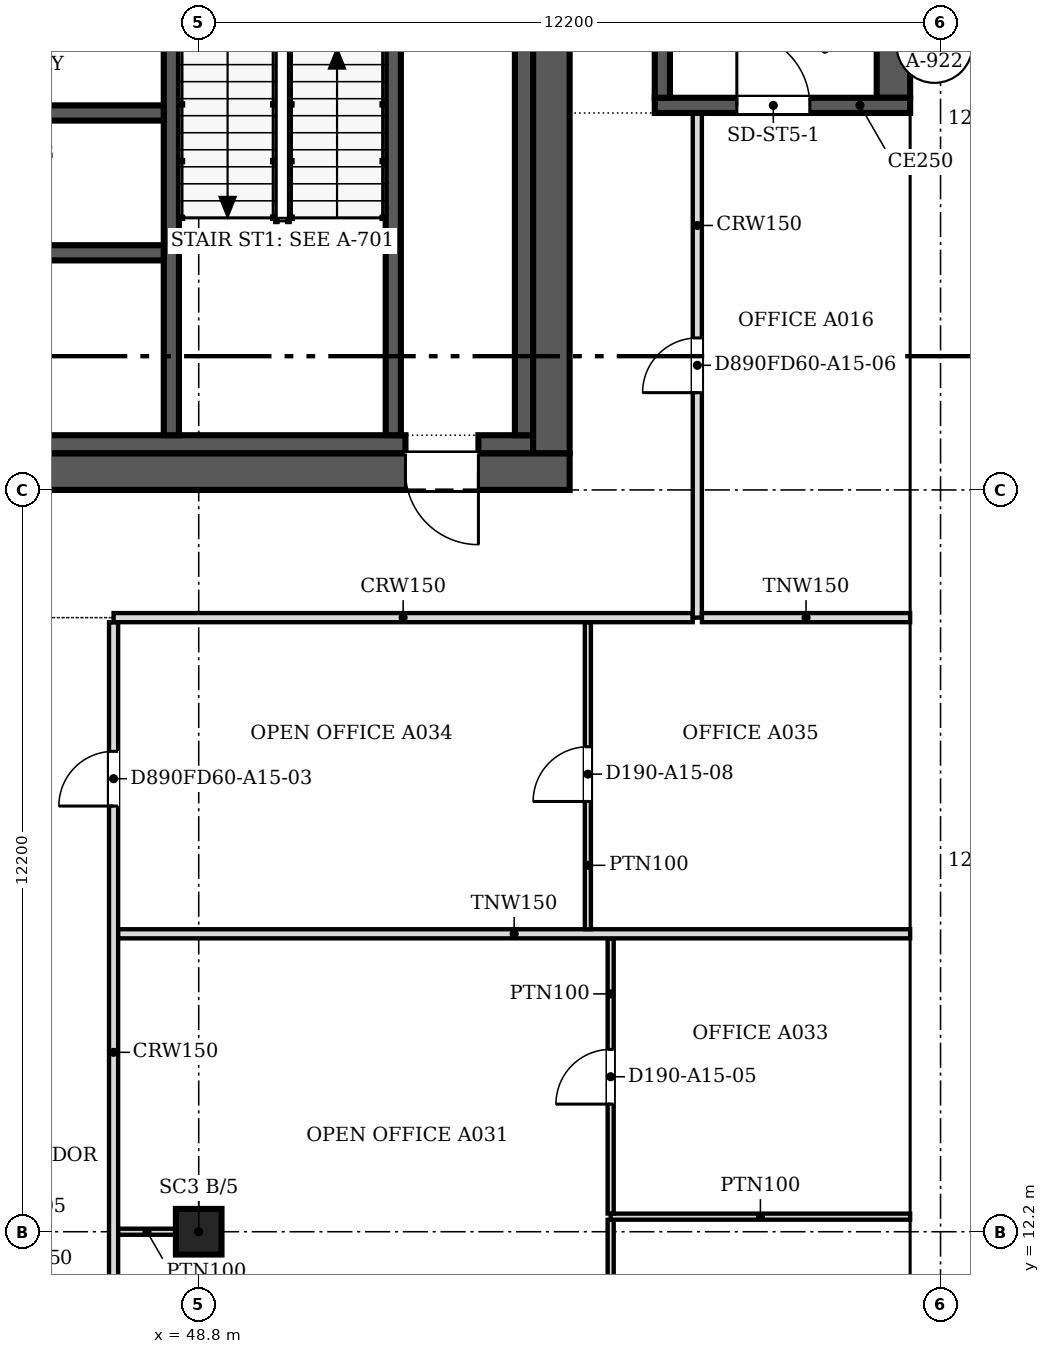
"""IFC4 building model, lengths in metres.
Left out: names, types, materials, properties, quantities, classifications, styles, units other than length and angle.
Written with IfcOpenShell. Run it as: python <this file> out.ifc"""

import sys

from ifc_helpers import new_model, si_unit, direction, frame, frame_2d, origin, origin_2d, place, context, subcontext, project, spatial, polyline, rectangle, outline, extrude, faceted_brep, source, transform, mapped, element, fill, save


model = new_model("IFC4")
c1 = context("Model", 3, precision=1e-05, world=origin(), true_north=direction((0.0, 1.0)))
c2 = subcontext(c1, "Body", "Model", "MODEL_VIEW")
j1 = project(units=[si_unit("LENGTHUNIT", "METRE"), si_unit("PLANEANGLEUNIT", "RADIAN")], contexts=[c1])
p1 = place(None, origin())
s1 = spatial("IfcSite", under=j1, at=p1, CompositionType="ELEMENT")
p2 = place(p1, origin())
s2 = spatial("IfcBuilding", under=s1, at=p2, CompositionType="ELEMENT")
p3 = place(p2, frame((0.0, 0.0, 166.8)))
s3 = spatial("IfcBuildingStorey", under=s2, at=p3, CompositionType="ELEMENT", Elevation=166.8)
p4 = place(p3, frame((48.8, 12.2, 0.0), z_axis=(0.0, 0.0, 1.0), x_axis=(1.0, 0.0, 0.0)))
e1 = element("IfcColumn", 1, at=p4, inside=s3, PredefinedType="COLUMN", context=c2, shape_type="SweptSolid", body=[
    extrude(rectangle(XDim=0.75, YDim=0.75, at=origin_2d()), origin(), (0.0, 0.0, 1.0), 3.6),
])
m1 = source(origin(), c2, "Body", "SweptSolid", [
    extrude(outline(polyline([(3.05, 0.0), (6.1, 3.8), (3.05, 7.6), (0.0, 3.8), (3.05, 0.0)])), frame((0.0, 0.25, 0.0), z_axis=(0.0, -1.0, 0.0), x_axis=(1.0, 0.0, 0.0)), (0.0, 0.0, 1.0), 0.5),
])
p5 = place(p3, frame((60.75, 9.15, -3.8), z_axis=(0.0, 0.0, 1.0), x_axis=(0.0, 1.0, 0.0)))
e2 = element("IfcWall", 2, at=p5, inside=s3, PredefinedType="SOLIDWALL", context=c2, shape_type="MappedRepresentation", body=[
    mapped(m1, transform((0.0, 0.0, 0.0), scale=1.0)),
])
m2 = source(origin(), c2, "Body", "SweptSolid", [
    extrude(outline(polyline([(3.05, 0.399), (5.78, 3.8), (3.05, 7.201), (0.321, 3.8), (3.05, 0.399)])), frame((0.0, 0.26, 0.0), z_axis=(0.0, -1.0, 0.0), x_axis=(1.0, 0.0, 0.0)), (0.0, 0.0, 1.0), 0.52),
])
p6 = place(p5, origin())
e3 = element("IfcOpeningElement", 3, at=p6, cuts=e2, PredefinedType="OPENING", context=c2, shape_type="MappedRepresentation", body=[
    mapped(m2, transform((0.0, 0.0, 0.0), scale=1.0)),
])
p7 = place(p3, frame((60.75, 15.25, -3.8), z_axis=(0.0, 0.0, 1.0), x_axis=(0.0, 1.0, 0.0)))
e4 = element("IfcWall", 4, at=p7, inside=s3, PredefinedType="SOLIDWALL", context=c2, shape_type="MappedRepresentation", body=[
    mapped(m1, transform((0.0, 0.0, 0.0), scale=1.0)),
])
p8 = place(p7, origin())
e5 = element("IfcOpeningElement", 5, at=p8, cuts=e4, PredefinedType="OPENING", context=c2, shape_type="MappedRepresentation", body=[
    mapped(m2, transform((0.0, 0.0, 0.0), scale=1.0)),
])
m3 = source(origin(), c2, "Body", "Brep", [
    faceted_brep([(3.05, -0.25, 0.0), (6.1, -0.25, 3.8), (6.1, -0.25, 3.8), (3.05, -0.25, 7.6), (0.0, -0.25, 3.8), (0.0, 0.25, 3.8), (3.05, 0.25, 7.6), (6.1, 0.25, 3.8), (6.1, 0.25, 3.8), (3.05, 0.25, 0.0)], [[[0, 1, 2, 3, 4]], [[5, 6, 7, 8, 9]], [[9, 8, 1, 0]], [[7, 6, 3, 2]], [[6, 5, 4, 3]], [[5, 9, 0, 4]], [[1, 8, 7, 2]]]),
])
p9 = place(p3, frame((60.75, 21.35, -3.8), z_axis=(0.0, 0.0, 1.0), x_axis=(0.0, 1.0, 0.0)))
e6 = element("IfcWall", 6, at=p9, inside=s3, PredefinedType="SOLIDWALL", context=c2, shape_type="MappedRepresentation", body=[
    mapped(m3, transform((0.0, 0.0, 0.0), scale=1.0)),
])
p10 = place(p9, origin())
e7 = element("IfcOpeningElement", 7, at=p10, cuts=e6, PredefinedType="OPENING", context=c2, shape_type="MappedRepresentation", body=[
    mapped(m2, transform((0.0, 0.0, 0.0), scale=1.0)),
])
p11 = place(p3, frame((60.75, 27.45, -3.8), z_axis=(0.0, 0.0, 1.0), x_axis=(0.0, 1.0, 0.0)))
e8 = element("IfcWall", 8, at=p11, inside=s3, PredefinedType="SOLIDWALL", context=c2, shape_type="MappedRepresentation", body=[
    mapped(m1, transform((0.0, 0.0, 0.0), scale=1.0)),
])
p12 = place(p11, origin())
e9 = element("IfcOpeningElement", 9, at=p12, cuts=e8, PredefinedType="OPENING", context=c2, shape_type="MappedRepresentation", body=[
    mapped(m2, transform((0.0, 0.0, 0.0), scale=1.0)),
])
p13 = place(p2, frame((0.0, 0.0, 170.6)))
s4 = spatial("IfcBuildingStorey", under=s2, at=p13, CompositionType="ELEMENT", Elevation=170.6)
m4 = source(origin(), c2, "Body", "Brep", [
    faceted_brep([(3.003, -0.25, 0.0), (6.053, -0.25, 3.8), (3.003, -0.25, 7.6), (0.0, -0.25, 3.8), (0.047, 0.25, 3.859), (3.003, 0.25, 7.6), (6.053, 0.25, 3.8), (3.003, 0.25, 0.0), (0.047, 0.25, 3.741), (0.0, 0.0, 3.8)], [[[0, 1, 2, 3]], [[4, 5, 6, 7, 8]], [[7, 6, 1, 0]], [[6, 5, 2, 1]], [[5, 4, 9, 3, 2]], [[8, 7, 0, 3, 9]], [[8, 9, 4]]]),
])
p14 = place(p13, frame((60.75, 6.146, -3.8), z_axis=(0.0, 0.0, 1.0), x_axis=(0.0, 1.0, 0.0)))
e10 = element("IfcWall", 10, at=p14, inside=s4, PredefinedType="SOLIDWALL", context=c2, shape_type="MappedRepresentation", body=[
    mapped(m4, transform((0.0, 0.0, 0.0), scale=1.0)),
])
m5 = source(origin(), c2, "Body", "SweptSolid", [
    extrude(outline(polyline([(3.005, 0.401), (5.733, 3.8), (3.005, 7.199), (0.319, 3.8), (3.005, 0.401)])), frame((0.0, 0.26, 0.0), z_axis=(0.0, -1.0, 0.0), x_axis=(1.0, 0.0, 0.0)), (0.0, 0.0, 1.0), 0.52),
])
p15 = place(p14, origin())
e11 = element("IfcOpeningElement", 11, at=p15, cuts=e10, PredefinedType="OPENING", context=c2, shape_type="MappedRepresentation", body=[
    mapped(m5, transform((0.0, 0.0, 0.0), scale=1.0)),
])
m6 = source(origin(), c2, "Body", "SweptSolid", [
    extrude(outline(polyline([(3.05, 0.0), (6.1, 3.8), (3.05, 7.6), (0.0, 3.8), (3.05, 0.0)])), frame((0.0, 0.25, 0.0), z_axis=(0.0, -1.0, 0.0), x_axis=(1.0, 0.0, 0.0)), (0.0, 0.0, 1.0), 0.5),
])
p16 = place(p13, frame((60.75, 12.2, -3.8), z_axis=(0.0, 0.0, 1.0), x_axis=(0.0, 1.0, 0.0)))
e12 = element("IfcWall", 12, at=p16, inside=s4, PredefinedType="SOLIDWALL", context=c2, shape_type="MappedRepresentation", body=[
    mapped(m6, transform((0.0, 0.0, 0.0), scale=1.0)),
])
m7 = source(origin(), c2, "Body", "SweptSolid", [
    extrude(outline(polyline([(3.05, 0.399), (5.78, 3.8), (3.05, 7.2), (0.321, 3.8), (3.05, 0.399)])), frame((0.0, 0.26, 0.0), z_axis=(0.0, -1.0, 0.0), x_axis=(1.0, 0.0, 0.0)), (0.0, 0.0, 1.0), 0.52),
])
p17 = place(p16, origin())
e13 = element("IfcOpeningElement", 13, at=p17, cuts=e12, PredefinedType="OPENING", context=c2, shape_type="MappedRepresentation", body=[
    mapped(m7, transform((0.0, 0.0, 0.0), scale=1.0)),
])
m8 = source(origin(), c2, "Body", "Brep", [
    faceted_brep([(3.05, -0.25, 0.0), (6.1, -0.25, 3.8), (6.1, -0.25, 3.8), (3.05, -0.25, 7.6), (0.0, -0.25, 3.8), (0.0, 0.25, 3.8), (3.05, 0.25, 7.6), (6.1, 0.25, 3.8), (6.1, 0.25, 3.8), (3.05, 0.25, 0.0)], [[[0, 1, 2, 3, 4]], [[5, 6, 7, 8, 9]], [[9, 8, 1, 0]], [[7, 6, 3, 2]], [[6, 5, 4, 3]], [[5, 9, 0, 4]], [[1, 8, 7, 2]]]),
])
p18 = place(p13, frame((60.75, 18.3, -3.8), z_axis=(0.0, 0.0, 1.0), x_axis=(0.0, 1.0, 0.0)))
e14 = element("IfcWall", 14, at=p18, inside=s4, PredefinedType="SOLIDWALL", context=c2, shape_type="MappedRepresentation", body=[
    mapped(m8, transform((0.0, 0.0, 0.0), scale=1.0)),
])
p19 = place(p18, origin())
e15 = element("IfcOpeningElement", 15, at=p19, cuts=e14, PredefinedType="OPENING", context=c2, shape_type="MappedRepresentation", body=[
    mapped(m7, transform((0.0, 0.0, 0.0), scale=1.0)),
])
p20 = place(p13, frame((60.75, 24.4, -3.8), z_axis=(0.0, 0.0, 1.0), x_axis=(0.0, 1.0, 0.0)))
e16 = element("IfcWall", 16, at=p20, inside=s4, PredefinedType="SOLIDWALL", context=c2, shape_type="MappedRepresentation", body=[
    mapped(m6, transform((0.0, 0.0, 0.0), scale=1.0)),
])
p21 = place(p20, origin())
e17 = element("IfcOpeningElement", 17, at=p21, cuts=e16, PredefinedType="OPENING", context=c2, shape_type="MappedRepresentation", body=[
    mapped(m7, transform((0.0, 0.0, 0.0), scale=1.0)),
])
p22 = place(p13, frame((60.75, 30.5, -3.8), z_axis=(0.0, 0.0, 1.0), x_axis=(0.0, 1.0, 0.0)))
e18 = element("IfcWall", 18, at=p22, inside=s4, PredefinedType="SOLIDWALL", context=c2, shape_type="MappedRepresentation", body=[
    mapped(m6, transform((0.0, 0.0, 0.0), scale=1.0)),
])
p23 = place(p22, origin())
e19 = element("IfcOpeningElement", 19, at=p23, cuts=e18, PredefinedType="OPENING", context=c2, shape_type="MappedRepresentation", body=[
    mapped(m7, transform((0.0, 0.0, 0.0), scale=1.0)),
])
p24 = place(p3, frame((54.9, 24.7, 0.0), z_axis=(0.0, 0.0, 1.0), x_axis=(-1.0, 0.0, 0.0)))
e20 = element("IfcWall", 20, at=p24, inside=s3, PredefinedType="SHEAR", context=c2, shape_type="SweptSolid", body=[
    extrude(rectangle(XDim=24.4, YDim=0.6, at=frame_2d((12.2, 0.0))), origin(), (0.0, 0.0, 1.0), 3.8),
])
m9 = source(origin(), c2, "Body", "SweptSolid", [
    extrude(rectangle(XDim=1.2, YDim=2.1, at=frame_2d((0.6, 1.05))), frame((0.0, 0.31, 0.0), z_axis=(0.0, -1.0, 0.0), x_axis=(1.0, 0.0, 0.0)), (0.0, 0.0, 1.0), 0.62),
])
p25 = place(p24, frame((1.5, 0.0, 0.0)))
e21 = element("IfcOpeningElement", 21, at=p25, cuts=e20, PredefinedType="OPENING", context=c2, shape_type="MappedRepresentation", body=[
    mapped(m9, transform((0.0, 0.0, 0.0), scale=1.0)),
])
p26 = place(p3, frame((54.6, 48.2, 0.0), z_axis=(0.0, 0.0, 1.0), x_axis=(0.0, -1.0, 0.0)))
e22 = element("IfcWall", 22, at=p26, inside=s3, PredefinedType="SHEAR", context=c2, shape_type="SweptSolid", body=[
    extrude(rectangle(XDim=23.2, YDim=0.6, at=frame_2d((11.6, 0.0))), origin(), (0.0, 0.0, 1.0), 3.8),
])
p27 = place(p26, frame((4.9, 0.0, 0.0)))
e23 = element("IfcOpeningElement", 23, at=p27, cuts=e22, PredefinedType="OPENING", context=c2, shape_type="MappedRepresentation", body=[
    mapped(m9, transform((0.0, 0.0, 0.0), scale=1.0)),
])
p28 = place(p3, frame((31.1, 25.15, 0.0), z_axis=(0.0, 0.0, 1.0), x_axis=(1.0, 0.0, 0.0)))
e24 = element("IfcWall", 24, at=p28, inside=s3, PredefinedType="SOLIDWALL", context=c2, shape_type="SweptSolid", body=[
    extrude(rectangle(XDim=21.1, YDim=0.3, at=frame_2d((10.55, 0.0))), origin(), (0.0, 0.0, 1.0), 3.8),
])
p29 = place(p3, frame((53.4, 25.15, 0.0), z_axis=(0.0, 0.0, 1.0), x_axis=(1.0, 0.0, 0.0)))
e25 = element("IfcWall", 25, at=p29, inside=s3, PredefinedType="SOLIDWALL", context=c2, shape_type="SweptSolid", body=[
    extrude(rectangle(XDim=0.9, YDim=0.3, at=frame_2d((0.45, 0.0))), origin(), (0.0, 0.0, 1.0), 3.8),
])
p30 = place(p3, frame((54.15, 25.3, 0.0), z_axis=(0.0, 0.0, 1.0), x_axis=(0.0, 1.0, 0.0)))
e26 = element("IfcWall", 26, at=p30, inside=s3, PredefinedType="SOLIDWALL", context=c2, shape_type="SweptSolid", body=[
    extrude(rectangle(XDim=11.02, YDim=0.3, at=frame_2d((5.51, 0.0))), origin(), (0.0, 0.0, 1.0), 3.8),
])
p31 = place(p3, frame((48.35, 36.35, 0.0), z_axis=(0.0, 0.0, 1.0), x_axis=(0.0, -1.0, 0.0)))
e27 = element("IfcWall", 27, at=p31, inside=s3, PredefinedType="SOLIDWALL", context=c2, shape_type="SweptSolid", body=[
    extrude(rectangle(XDim=11.05, YDim=0.25, at=frame_2d((5.525, 0.0))), origin(), (0.0, 0.0, 1.0), 3.8),
])
m10 = source(origin(), c2, "Body", "SweptSolid", [
    extrude(rectangle(XDim=1.2, YDim=2.1, at=frame_2d((0.6, 1.05))), frame((0.0, 0.135, 0.0), z_axis=(0.0, -1.0, 0.0), x_axis=(1.0, 0.0, 0.0)), (0.0, 0.0, 1.0), 0.27),
])
p32 = place(p31, frame((3.225, 0.0, 0.0)))
e28 = element("IfcOpeningElement", 28, at=p32, cuts=e27, PredefinedType="OPENING", context=c2, shape_type="MappedRepresentation", body=[
    mapped(m10, transform((0.0, 0.0, 0.0), scale=1.0)),
])
p33 = place(p3, frame((52.0, 25.3, 0.0), z_axis=(0.0, 0.0, 1.0), x_axis=(0.0, 1.0, 0.0)))
e29 = element("IfcWall", 29, at=p33, inside=s3, PredefinedType="SOLIDWALL", context=c2, shape_type="SweptSolid", body=[
    extrude(rectangle(XDim=7.975, YDim=0.25, at=frame_2d((3.987, 0.0))), origin(), (0.0, 0.0, 1.0), 3.8),
])
p34 = place(p33, frame((6.625, 0.0, 0.0)))
e30 = element("IfcOpeningElement", 30, at=p34, cuts=e29, PredefinedType="OPENING", context=c2, shape_type="MappedRepresentation", body=[
    mapped(m10, transform((0.0, 0.0, 0.0), scale=1.0)),
])
for number, where, z_axis, x_axis in (
    (31, (42.95, 28.3, 0.0), (0.0, 0.0, 1.0), (1.0, 0.0, 0.0)),
    (32, (42.95, 30.6, 0.0), (0.0, 0.0, 1.0), (1.0, 0.0, 0.0)),
):
    element("IfcWall", number, at=place(p3, frame(where, z_axis=z_axis, x_axis=x_axis)), inside=s3, PredefinedType="SOLIDWALL", context=c2, shape_type="SweptSolid", body=[
        extrude(rectangle(XDim=5.275, YDim=0.25, at=frame_2d((2.638, 0.0))), origin(), (0.0, 0.0, 1.0), 3.8),
    ])
p35 = place(p3, frame((60.5, 30.725, 0.0), z_axis=(0.0, 0.0, 1.0), x_axis=(-1.0, 0.0, 0.0)))
e33 = element("IfcWall", 33, at=p35, inside=s3, PredefinedType="SOLIDWALL", context=c2, shape_type="SweptSolid", body=[
    extrude(rectangle(XDim=4.2, YDim=0.25, at=frame_2d((2.1, 0.0))), origin(), (0.0, 0.0, 1.0), 3.8),
])
p36 = place(p35, frame((1.65, 0.0, 0.0)))
e34 = element("IfcOpeningElement", 34, at=p36, cuts=e33, PredefinedType="OPENING", context=c2, shape_type="MappedRepresentation", body=[
    mapped(m10, transform((0.0, 0.0, 0.0), scale=1.0)),
])
p37 = place(p3, frame((56.425, 30.85, 0.0), z_axis=(0.0, 0.0, 1.0), x_axis=(0.0, 1.0, 0.0)))
e35 = element("IfcWall", 35, at=p37, inside=s3, PredefinedType="SOLIDWALL", context=c2, shape_type="SweptSolid", body=[
    extrude(rectangle(XDim=8.0, YDim=0.25, at=frame_2d((4.0, 0.0))), origin(), (0.0, 0.0, 1.0), 3.8),
])
p38 = place(p3, frame((60.225, 38.85, 0.0), z_axis=(0.0, 0.0, 1.0), x_axis=(0.0, -1.0, 0.0)))
e36 = element("IfcWall", 36, at=p38, inside=s3, PredefinedType="SOLIDWALL", context=c2, shape_type="SweptSolid", body=[
    extrude(rectangle(XDim=8.0, YDim=0.55, at=frame_2d((4.0, 0.0))), origin(), (0.0, 0.0, 1.0), 3.8),
])
p39 = place(p3, frame((47.4, 22.224, 0.0), z_axis=(0.0, 0.0, 1.0), x_axis=(0.0, -1.0, 0.0)))
e37 = element("IfcWall", 37, at=p39, inside=s3, PredefinedType="PARTITIONING", context=c2, shape_type="SweptSolid", body=[
    extrude(rectangle(XDim=18.024, YDim=0.15, at=frame_2d((9.012, 0.0))), origin(), (0.0, 0.0, 1.0), 3.067),
])
m11 = source(origin(), c2, "Body", "SweptSolid", [
    extrude(rectangle(XDim=0.9, YDim=2.1, at=frame_2d((0.45, 1.05))), frame((0.0, 0.085, 0.0), z_axis=(0.0, -1.0, 0.0), x_axis=(1.0, 0.0, 0.0)), (0.0, 0.0, 1.0), 0.17),
])
p40 = place(p39, frame((2.123, 0.0, 0.0)))
e38 = element("IfcOpeningElement", 38, at=p40, cuts=e37, PredefinedType="OPENING", context=c2, shape_type="MappedRepresentation", body=[
    mapped(m11, transform((0.0, 0.0, 0.0), scale=1.0)),
])
p41 = place(p39, frame((11.124, 0.0, 0.0)))
e39 = element("IfcOpeningElement", 39, at=p41, cuts=e37, PredefinedType="OPENING", context=c2, shape_type="MappedRepresentation", body=[
    mapped(m11, transform((0.0, 0.0, 0.0), scale=1.0)),
])
p42 = place(p3, frame((55.575, 12.397, 0.0), z_axis=(0.0, 0.0, 1.0), x_axis=(0.0, -1.0, 0.0)))
e40 = element("IfcWall", 40, at=p42, inside=s3, PredefinedType="PARTITIONING", context=c2, shape_type="SweptSolid", body=[
    extrude(rectangle(XDim=4.297, YDim=0.1, at=frame_2d((2.148, 0.0))), origin(), (0.0, 0.0, 1.0), 3.067),
])
m12 = source(origin(), c2, "Body", "SweptSolid", [
    extrude(rectangle(XDim=0.9, YDim=2.1, at=frame_2d((0.45, 1.05))), frame((0.0, 0.06, 0.0), z_axis=(0.0, -1.0, 0.0), x_axis=(1.0, 0.0, 0.0)), (0.0, 0.0, 1.0), 0.12),
])
p43 = place(p42, frame((1.697, 0.0, 0.0)))
e41 = element("IfcOpeningElement", 41, at=p43, cuts=e40, PredefinedType="OPENING", context=c2, shape_type="MappedRepresentation", body=[
    mapped(m12, transform((0.0, 0.0, 0.0), scale=1.0)),
])
p44 = place(p3, frame((48.425, 12.2, 0.0), z_axis=(0.0, 0.0, 1.0), x_axis=(-1.0, 0.0, 0.0)))
e42 = element("IfcWall", 42, at=p44, inside=s3, PredefinedType="PARTITIONING", context=c2, shape_type="SweptSolid", body=[
    extrude(rectangle(XDim=0.95, YDim=0.1, at=frame_2d((0.475, 0.0))), origin(), (0.0, 0.0, 1.0), 3.067),
])
p45 = place(p3, frame((55.575, 12.448, 0.0), z_axis=(0.0, 0.0, 1.0), x_axis=(1.0, 0.0, 0.0)))
e43 = element("IfcWall", 43, at=p45, inside=s3, PredefinedType="PARTITIONING", context=c2, shape_type="SweptSolid", body=[
    extrude(rectangle(XDim=4.925, YDim=0.1, at=frame_2d((2.462, 0.0))), origin(), (0.0, 0.0, 1.0), 3.067),
])
p46 = place(p3, frame((55.575, 17.024, 0.0), z_axis=(0.0, 0.0, 1.0), x_axis=(0.0, -1.0, 0.0)))
e44 = element("IfcWall", 44, at=p46, inside=s3, PredefinedType="PARTITIONING", context=c2, shape_type="SweptSolid", body=[
    extrude(rectangle(XDim=4.525, YDim=0.1, at=frame_2d((2.263, 0.0))), origin(), (0.0, 0.0, 1.0), 3.067),
])
p47 = place(p46, frame((1.825, 0.0, 0.0)))
e45 = element("IfcOpeningElement", 45, at=p47, cuts=e44, PredefinedType="OPENING", context=c2, shape_type="MappedRepresentation", body=[
    mapped(m12, transform((0.0, 0.0, 0.0), scale=1.0)),
])
p48 = place(p3, frame((47.476, 17.1, 0.0), z_axis=(0.0, 0.0, 1.0), x_axis=(1.0, 0.0, 0.0)))
e46 = element("IfcWall", 46, at=p48, inside=s3, PredefinedType="PARTITIONING", context=c2, shape_type="SweptSolid", body=[
    extrude(rectangle(XDim=13.024, YDim=0.15, at=frame_2d((6.512, 0.0))), origin(), (0.0, 0.0, 1.0), 3.067),
])
p49 = place(p3, frame((55.2, 22.224, 0.0), z_axis=(0.0, 0.0, 1.0), x_axis=(0.0, -1.0, 0.0)))
e47 = element("IfcWall", 47, at=p49, inside=s3, PredefinedType="PARTITIONING", context=c2, shape_type="SweptSolid", body=[
    extrude(rectangle(XDim=5.048, YDim=0.1, at=frame_2d((2.524, 0.0))), origin(), (0.0, 0.0, 1.0), 3.067),
])
p50 = place(p49, frame((2.048, 0.0, 0.0)))
e48 = element("IfcOpeningElement", 48, at=p50, cuts=e47, PredefinedType="OPENING", context=c2, shape_type="MappedRepresentation", body=[
    mapped(m12, transform((0.0, 0.0, 0.0), scale=1.0)),
])
p51 = place(p3, frame((47.4, 22.3, 0.0), z_axis=(0.0, 0.0, 1.0), x_axis=(1.0, 0.0, 0.0)))
e49 = element("IfcWall", 49, at=p51, inside=s3, PredefinedType="PARTITIONING", context=c2, shape_type="SweptSolid", body=[
    extrude(rectangle(XDim=9.524, YDim=0.15, at=frame_2d((4.762, 0.0))), origin(), (0.0, 0.0, 1.0), 3.067),
])
p52 = place(p3, frame((57.0, 30.6, 0.0), z_axis=(0.0, 0.0, 1.0), x_axis=(0.0, -1.0, 0.0)))
e50 = element("IfcWall", 50, at=p52, inside=s3, PredefinedType="PARTITIONING", context=c2, shape_type="SweptSolid", body=[
    extrude(rectangle(XDim=8.3, YDim=0.15, at=frame_2d((4.15, 0.0))), origin(), (0.0, 0.0, 1.0), 3.067),
])
p53 = place(p52, frame((3.7, 0.0, 0.0)))
e51 = element("IfcOpeningElement", 51, at=p53, cuts=e50, PredefinedType="OPENING", context=c2, shape_type="MappedRepresentation", body=[
    mapped(m11, transform((0.0, 0.0, 0.0), scale=1.0)),
])
p54 = place(p3, frame((57.076, 22.3, 0.0), z_axis=(0.0, 0.0, 1.0), x_axis=(1.0, 0.0, 0.0)))
e52 = element("IfcWall", 52, at=p54, inside=s3, PredefinedType="PARTITIONING", context=c2, shape_type="SweptSolid", body=[
    extrude(rectangle(XDim=3.424, YDim=0.15, at=frame_2d((1.712, 0.0))), origin(), (0.0, 0.0, 1.0), 3.067),
])
m13 = source(origin(), c2, "Body", "SweptSolid", [
    extrude(rectangle(XDim=1.2, YDim=2.1, at=frame_2d((0.6, 1.05))), frame((0.0, 0.025, 0.0), z_axis=(0.0, -1.0, 0.0), x_axis=(1.0, 0.0, 0.0)), (0.0, 0.0, 1.0), 0.05),
])
p55 = place(p25, origin())
e53 = element("IfcDoor", 53, at=p55, inside=s3, OperationType="SINGLE_SWING_LEFT", PredefinedType="DOOR", context=c2, shape_type="MappedRepresentation", body=[
    mapped(m13, transform((0.0, 0.0, 0.0), scale=1.0)),
])
fill(e21, e53)
p56 = place(p36, origin())
e54 = element("IfcDoor", 54, at=p56, inside=s3, OperationType="SINGLE_SWING_RIGHT", PredefinedType="DOOR", context=c2, shape_type="MappedRepresentation", body=[
    mapped(m13, transform((0.0, 0.0, 0.0), scale=1.0)),
])
fill(e34, e54)
m14 = source(origin(), c2, "Body", "SweptSolid", [
    extrude(rectangle(XDim=0.9, YDim=2.1, at=frame_2d((0.45, 1.05))), frame((0.0, 0.025, 0.0), z_axis=(0.0, -1.0, 0.0), x_axis=(1.0, 0.0, 0.0)), (0.0, 0.0, 1.0), 0.05),
])
p57 = place(p47, origin())
e55 = element("IfcDoor", 55, at=p57, inside=s3, OperationType="SINGLE_SWING_RIGHT", PredefinedType="DOOR", context=c2, shape_type="MappedRepresentation", body=[
    mapped(m14, transform((0.0, 0.0, 0.0), scale=1.0)),
])
fill(e45, e55)
p58 = place(p50, origin())
e56 = element("IfcDoor", 56, at=p58, inside=s3, OperationType="SINGLE_SWING_RIGHT", PredefinedType="DOOR", context=c2, shape_type="MappedRepresentation", body=[
    mapped(m14, transform((0.0, 0.0, 0.0), scale=1.0)),
])
fill(e48, e56)
p59 = place(p40, origin())
e57 = element("IfcDoor", 57, at=p59, inside=s3, OperationType="SINGLE_SWING_RIGHT", PredefinedType="DOOR", context=c2, shape_type="MappedRepresentation", body=[
    mapped(m14, transform((0.0, 0.0, 0.0), scale=1.0)),
])
fill(e38, e57)
p60 = place(p53, origin())
e58 = element("IfcDoor", 58, at=p60, inside=s3, OperationType="SINGLE_SWING_RIGHT", PredefinedType="DOOR", context=c2, shape_type="MappedRepresentation", body=[
    mapped(m14, transform((0.0, 0.0, 0.0), scale=1.0)),
])
fill(e51, e58)
save(model, sys.argv[1])
